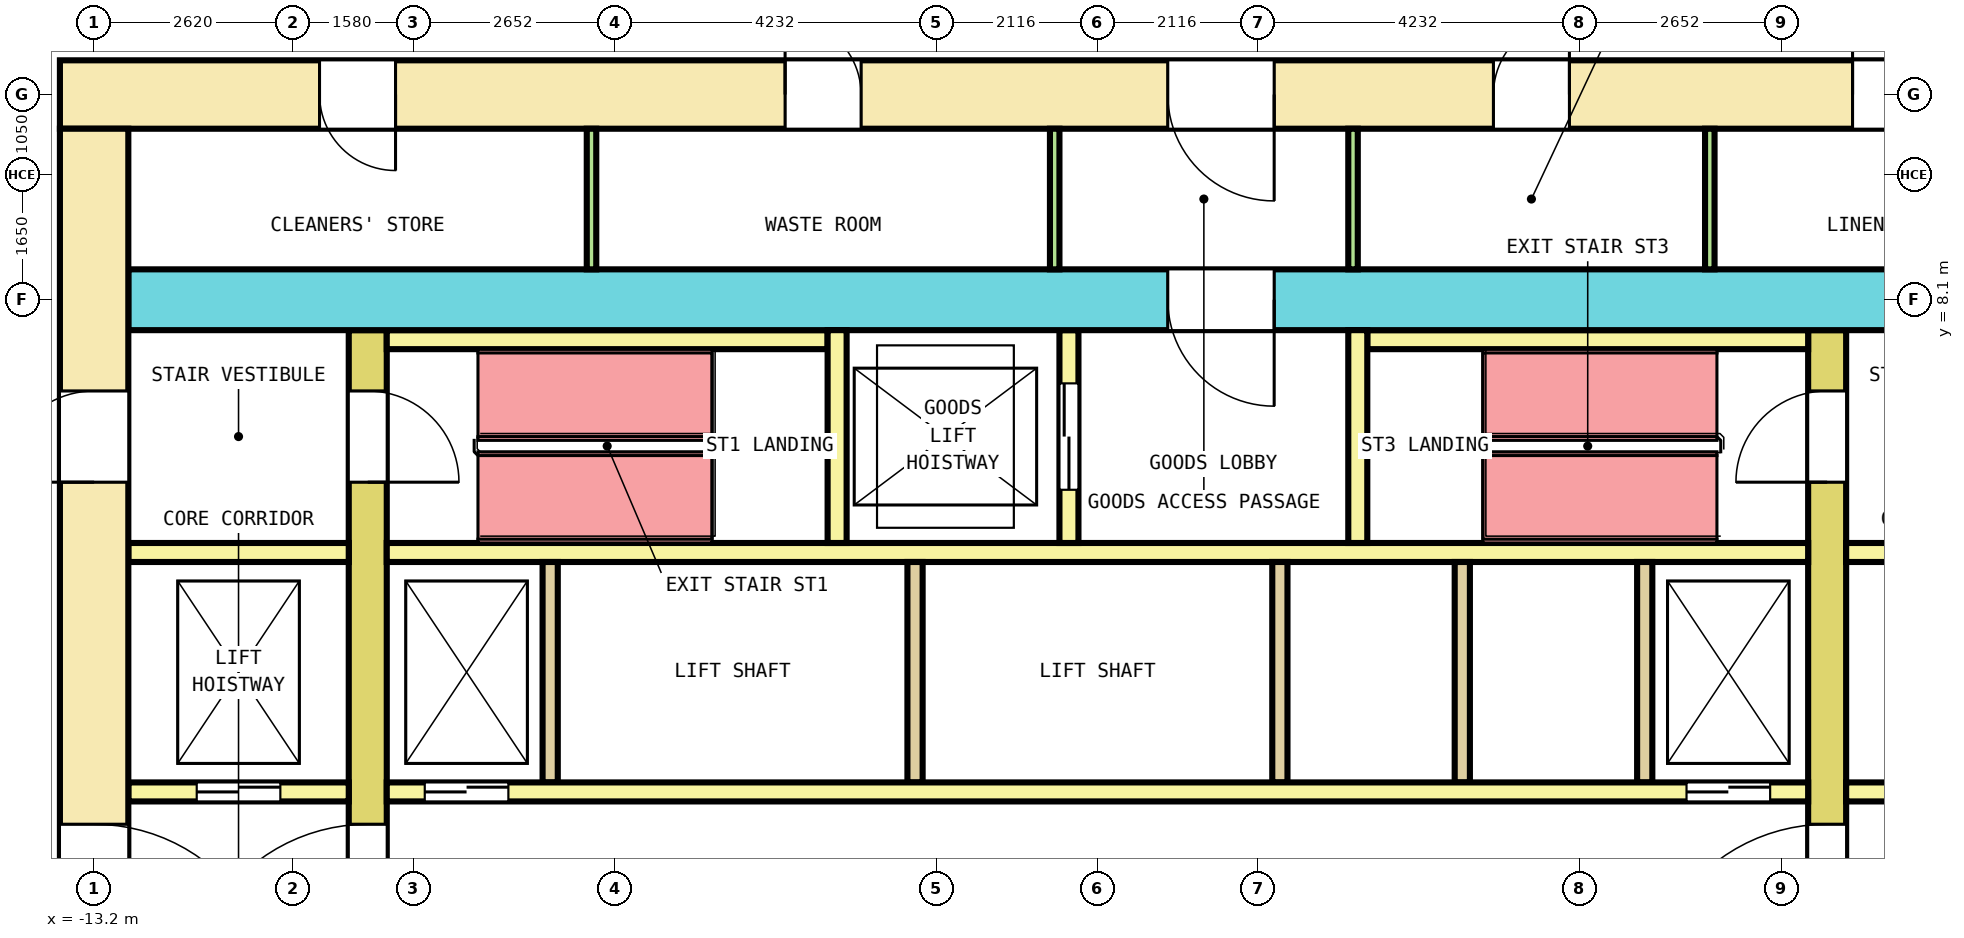
"""IFC4 building model, lengths in metres.
Left out: names, types, materials, properties, quantities, classifications, styles, units other than length and angle.
Written with IfcOpenShell. Run it as: python <this file> out.ifc"""

import sys

from ifc_helpers import new_model, si_unit, direction, frame, frame_2d, origin, place, context, subcontext, project, spatial, rectangle, extrude, element, fill, save


model = new_model("IFC4")
c1 = context("Model", 3, precision=1e-05, world=origin(), true_north=direction((0.0, 1.0)))
c2 = subcontext(c1, "Body", "Model", "MODEL_VIEW")
j1 = project(units=[si_unit("LENGTHUNIT", "METRE"), si_unit("PLANEANGLEUNIT", "RADIAN")], contexts=[c1])
p1 = place(None, origin())
s1 = spatial("IfcSite", under=j1, at=p1, CompositionType="ELEMENT")
p2 = place(p1, origin())
s2 = spatial("IfcBuilding", under=s1, at=p2, CompositionType="ELEMENT")
p3 = place(p2, frame((0.0, 0.0, 67.4)))
s3 = spatial("IfcBuildingStorey", under=s2, at=p3, CompositionType="ELEMENT", Elevation=67.4)
p4 = place(p3, frame((-13.65, 10.8, 0.0), z_axis=(0.0, 0.0, 1.0), x_axis=(1.0, 0.0, 0.0)))
e1 = element("IfcWall", 1, at=p4, inside=s3, PredefinedType="SHEAR", context=c2, shape_type="SweptSolid", body=[
    extrude(rectangle(XDim=27.3, YDim=0.9, at=frame_2d((13.65, 0.0))), origin(), (0.0, 0.0, 1.0), 4.1),
])
p5 = place(p4, frame((3.416, 0.0, 0.0)))
e2 = element("IfcOpeningElement", 2, at=p5, cuts=e1, PredefinedType="OPENING", context=c2, shape_type="SweptSolid", body=[
    extrude(rectangle(XDim=1.0, YDim=2.1, at=frame_2d((0.5, 1.05))), frame((0.0, 0.46, 0.0), z_axis=(0.0, -1.0, 0.0), x_axis=(1.0, 0.0, 0.0)), (0.0, 0.0, 1.0), 0.92),
])
p6 = place(p4, frame((9.541, 0.0, 0.0)))
e3 = element("IfcOpeningElement", 3, at=p6, cuts=e1, PredefinedType="OPENING", context=c2, shape_type="SweptSolid", body=[
    extrude(rectangle(XDim=1.0, YDim=2.1, at=frame_2d((0.5, 1.05))), frame((0.0, 0.46, 0.0), z_axis=(0.0, -1.0, 0.0), x_axis=(1.0, 0.0, 0.0)), (0.0, 0.0, 1.0), 0.92),
])
p7 = place(p4, frame((18.859, 0.0, 0.0)))
e4 = element("IfcOpeningElement", 4, at=p7, cuts=e1, PredefinedType="OPENING", context=c2, shape_type="SweptSolid", body=[
    extrude(rectangle(XDim=1.0, YDim=2.1, at=frame_2d((0.5, 1.05))), frame((0.0, 0.46, 0.0), z_axis=(0.0, -1.0, 0.0), x_axis=(1.0, 0.0, 0.0)), (0.0, 0.0, 1.0), 0.92),
])
p8 = place(p4, frame((23.584, 0.0, 0.0)))
e5 = element("IfcOpeningElement", 5, at=p8, cuts=e1, PredefinedType="OPENING", context=c2, shape_type="SweptSolid", body=[
    extrude(rectangle(XDim=1.0, YDim=2.1, at=frame_2d((0.5, 1.05))), frame((0.0, 0.46, 0.0), z_axis=(0.0, -1.0, 0.0), x_axis=(1.0, 0.0, 0.0)), (0.0, 0.0, 1.0), 0.92),
])
p9 = place(p4, frame((14.575, 0.0, 0.0)))
e6 = element("IfcOpeningElement", 6, at=p9, cuts=e1, PredefinedType="OPENING", context=c2, shape_type="SweptSolid", body=[
    extrude(rectangle(XDim=1.4, YDim=2.1, at=frame_2d((0.7, 1.05))), frame((0.0, 0.46, 0.0), z_axis=(0.0, -1.0, 0.0), x_axis=(1.0, 0.0, 0.0)), (0.0, 0.0, 1.0), 0.92),
])
p10 = place(p3, frame((-13.2, -10.35, 0.0), z_axis=(0.0, 0.0, 1.0), x_axis=(0.0, 1.0, 0.0)))
e7 = element("IfcWall", 7, at=p10, inside=s3, PredefinedType="SHEAR", context=c2, shape_type="SweptSolid", body=[
    extrude(rectangle(XDim=20.7, YDim=0.9, at=frame_2d((10.35, 0.0))), origin(), (0.0, 0.0, 1.0), 4.1),
])
p11 = place(p10, frame((9.15, 0.0, 0.0)))
e8 = element("IfcOpeningElement", 8, at=p11, cuts=e7, PredefinedType="OPENING", context=c2, shape_type="SweptSolid", body=[
    extrude(rectangle(XDim=2.4, YDim=2.1, at=frame_2d((1.2, 1.05))), frame((0.0, 0.46, 0.0), z_axis=(0.0, -1.0, 0.0), x_axis=(1.0, 0.0, 0.0)), (0.0, 0.0, 1.0), 0.92),
])
p12 = place(p10, frame((16.05, 0.0, 0.0)))
e9 = element("IfcOpeningElement", 9, at=p12, cuts=e7, PredefinedType="OPENING", context=c2, shape_type="SweptSolid", body=[
    extrude(rectangle(XDim=1.2, YDim=2.1, at=frame_2d((0.6, 1.05))), frame((0.0, 0.46, 0.0), z_axis=(0.0, -1.0, 0.0), x_axis=(1.0, 0.0, 0.0)), (0.0, 0.0, 1.0), 0.92),
])
p13 = place(p10, frame((3.45, 0.0, 0.0)))
e10 = element("IfcOpeningElement", 10, at=p13, cuts=e7, PredefinedType="OPENING", context=c2, shape_type="SweptSolid", body=[
    extrude(rectangle(XDim=1.2, YDim=2.1, at=frame_2d((0.6, 1.05))), frame((0.0, 0.46, 0.0), z_axis=(0.0, -1.0, 0.0), x_axis=(1.0, 0.0, 0.0)), (0.0, 0.0, 1.0), 0.92),
])
p14 = place(p3, frame((-12.75, 8.1, 0.0), z_axis=(0.0, 0.0, 1.0), x_axis=(1.0, 0.0, 0.0)))
e11 = element("IfcWall", 11, at=p14, inside=s3, PredefinedType="SHEAR", context=c2, shape_type="SweptSolid", body=[
    extrude(rectangle(XDim=25.5, YDim=0.8, at=frame_2d((12.75, 0.0))), origin(), (0.0, 0.0, 1.0), 4.1),
])
p15 = place(p14, frame((13.675, 0.0, 0.0)))
e12 = element("IfcOpeningElement", 12, at=p15, cuts=e11, PredefinedType="OPENING", context=c2, shape_type="SweptSolid", body=[
    extrude(rectangle(XDim=1.4, YDim=2.1, at=frame_2d((0.7, 1.05))), frame((0.0, 0.41, 0.0), z_axis=(0.0, -1.0, 0.0), x_axis=(1.0, 0.0, 0.0)), (0.0, 0.0, 1.0), 0.82),
])
p16 = place(p3, frame((-9.6, -7.7, 0.0), z_axis=(0.0, 0.0, 1.0), x_axis=(0.0, 1.0, 0.0)))
e13 = element("IfcWall", 13, at=p16, inside=s3, PredefinedType="SHEAR", context=c2, shape_type="SweptSolid", body=[
    extrude(rectangle(XDim=15.4, YDim=0.5, at=frame_2d((7.7, 0.0))), origin(), (0.0, 0.0, 1.0), 4.1),
])
p17 = place(p16, frame((6.5, 0.0, 0.0)))
e14 = element("IfcOpeningElement", 14, at=p17, cuts=e13, PredefinedType="OPENING", context=c2, shape_type="SweptSolid", body=[
    extrude(rectangle(XDim=2.4, YDim=2.1, at=frame_2d((1.2, 1.05))), frame((0.0, 0.26, 0.0), z_axis=(0.0, -1.0, 0.0), x_axis=(1.0, 0.0, 0.0)), (0.0, 0.0, 1.0), 0.52),
])
p18 = place(p16, frame((13.4, 0.0, 0.0)))
e15 = element("IfcOpeningElement", 15, at=p18, cuts=e13, PredefinedType="OPENING", context=c2, shape_type="SweptSolid", body=[
    extrude(rectangle(XDim=1.2, YDim=2.1, at=frame_2d((0.6, 1.05))), frame((0.0, 0.26, 0.0), z_axis=(0.0, -1.0, 0.0), x_axis=(1.0, 0.0, 0.0)), (0.0, 0.0, 1.0), 0.52),
])
p19 = place(p16, frame((0.8, 0.0, 0.0)))
e16 = element("IfcOpeningElement", 16, at=p19, cuts=e13, PredefinedType="OPENING", context=c2, shape_type="SweptSolid", body=[
    extrude(rectangle(XDim=1.2, YDim=2.1, at=frame_2d((0.6, 1.05))), frame((0.0, 0.26, 0.0), z_axis=(0.0, -1.0, 0.0), x_axis=(1.0, 0.0, 0.0)), (0.0, 0.0, 1.0), 0.52),
])
p20 = place(p3, frame((9.6, -7.7, 0.0), z_axis=(0.0, 0.0, 1.0), x_axis=(0.0, 1.0, 0.0)))
e17 = element("IfcWall", 17, at=p20, inside=s3, PredefinedType="SHEAR", context=c2, shape_type="SweptSolid", body=[
    extrude(rectangle(XDim=15.4, YDim=0.5, at=frame_2d((7.7, 0.0))), origin(), (0.0, 0.0, 1.0), 4.1),
])
p21 = place(p20, frame((6.5, 0.0, 0.0)))
e18 = element("IfcOpeningElement", 18, at=p21, cuts=e17, PredefinedType="OPENING", context=c2, shape_type="SweptSolid", body=[
    extrude(rectangle(XDim=2.4, YDim=2.1, at=frame_2d((1.2, 1.05))), frame((0.0, 0.26, 0.0), z_axis=(0.0, -1.0, 0.0), x_axis=(1.0, 0.0, 0.0)), (0.0, 0.0, 1.0), 0.52),
])
p22 = place(p20, frame((13.4, 0.0, 0.0)))
e19 = element("IfcOpeningElement", 19, at=p22, cuts=e17, PredefinedType="OPENING", context=c2, shape_type="SweptSolid", body=[
    extrude(rectangle(XDim=1.2, YDim=2.1, at=frame_2d((0.6, 1.05))), frame((0.0, 0.26, 0.0), z_axis=(0.0, -1.0, 0.0), x_axis=(1.0, 0.0, 0.0)), (0.0, 0.0, 1.0), 0.52),
])
p23 = place(p20, frame((0.9, 0.0, 0.0)))
e20 = element("IfcOpeningElement", 20, at=p23, cuts=e17, PredefinedType="OPENING", context=c2, shape_type="SweptSolid", body=[
    extrude(rectangle(XDim=1.0, YDim=2.1, at=frame_2d((0.5, 1.05))), frame((0.0, 0.26, 0.0), z_axis=(0.0, -1.0, 0.0), x_axis=(1.0, 0.0, 0.0)), (0.0, 0.0, 1.0), 0.52),
])
p24 = place(p3, frame((-12.75, 1.625, 0.0), z_axis=(0.0, 0.0, 1.0), x_axis=(1.0, 0.0, 0.0)))
e21 = element("IfcWall", 21, at=p24, inside=s3, PredefinedType="SOLIDWALL", context=c2, shape_type="SweptSolid", body=[
    extrude(rectangle(XDim=2.9, YDim=0.25, at=frame_2d((1.45, 0.0))), origin(), (0.0, 0.0, 1.0), 4.1),
])
p25 = place(p24, frame((0.9, 0.0, 0.0)))
e22 = element("IfcOpeningElement", 22, at=p25, cuts=e21, PredefinedType="OPENING", context=c2, shape_type="SweptSolid", body=[
    extrude(rectangle(XDim=1.1, YDim=2.1, at=frame_2d((0.55, 1.05))), frame((0.0, 0.135, 0.0), z_axis=(0.0, -1.0, 0.0), x_axis=(1.0, 0.0, 0.0)), (0.0, 0.0, 1.0), 0.27),
])
p26 = place(p3, frame((-9.35, 1.625, 0.0), z_axis=(0.0, 0.0, 1.0), x_axis=(1.0, 0.0, 0.0)))
e23 = element("IfcWall", 23, at=p26, inside=s3, PredefinedType="SOLIDWALL", context=c2, shape_type="SweptSolid", body=[
    extrude(rectangle(XDim=18.7, YDim=0.25, at=frame_2d((9.35, 0.0))), origin(), (0.0, 0.0, 1.0), 4.1),
])
p27 = place(p26, frame((0.5, 0.0, 0.0)))
e24 = element("IfcOpeningElement", 24, at=p27, cuts=e23, PredefinedType="OPENING", context=c2, shape_type="SweptSolid", body=[
    extrude(rectangle(XDim=1.1, YDim=2.1, at=frame_2d((0.55, 1.05))), frame((0.0, 0.135, 0.0), z_axis=(0.0, -1.0, 0.0), x_axis=(1.0, 0.0, 0.0)), (0.0, 0.0, 1.0), 0.27),
])
p28 = place(p26, frame((17.1, 0.0, 0.0)))
e25 = element("IfcOpeningElement", 25, at=p28, cuts=e23, PredefinedType="OPENING", context=c2, shape_type="SweptSolid", body=[
    extrude(rectangle(XDim=1.1, YDim=2.1, at=frame_2d((0.55, 1.05))), frame((0.0, 0.135, 0.0), z_axis=(0.0, -1.0, 0.0), x_axis=(1.0, 0.0, 0.0)), (0.0, 0.0, 1.0), 0.27),
])
p29 = place(p3, frame((9.85, 1.625, 0.0), z_axis=(0.0, 0.0, 1.0), x_axis=(1.0, 0.0, 0.0)))
e26 = element("IfcWall", 26, at=p29, inside=s3, PredefinedType="SOLIDWALL", context=c2, shape_type="SweptSolid", body=[
    extrude(rectangle(XDim=2.9, YDim=0.25, at=frame_2d((1.45, 0.0))), origin(), (0.0, 0.0, 1.0), 4.1),
])
p30 = place(p29, frame((0.9, 0.0, 0.0)))
e27 = element("IfcOpeningElement", 27, at=p30, cuts=e26, PredefinedType="OPENING", context=c2, shape_type="SweptSolid", body=[
    extrude(rectangle(XDim=1.1, YDim=2.1, at=frame_2d((0.55, 1.05))), frame((0.0, 0.135, 0.0), z_axis=(0.0, -1.0, 0.0), x_axis=(1.0, 0.0, 0.0)), (0.0, 0.0, 1.0), 0.27),
])
p31 = place(p3, frame((-12.75, 4.775, 0.0), z_axis=(0.0, 0.0, 1.0), x_axis=(1.0, 0.0, 0.0)))
e28 = element("IfcWall", 28, at=p31, inside=s3, PredefinedType="SOLIDWALL", context=c2, shape_type="SweptSolid", body=[
    extrude(rectangle(XDim=2.9, YDim=0.25, at=frame_2d((1.45, 0.0))), origin(), (0.0, 0.0, 1.0), 4.1),
])
p32 = place(p3, frame((-9.35, 4.775, 0.0), z_axis=(0.0, 0.0, 1.0), x_axis=(1.0, 0.0, 0.0)))
e29 = element("IfcWall", 29, at=p32, inside=s3, PredefinedType="SOLIDWALL", context=c2, shape_type="SweptSolid", body=[
    extrude(rectangle(XDim=18.7, YDim=0.25, at=frame_2d((9.35, 0.0))), origin(), (0.0, 0.0, 1.0), 4.1),
])
p33 = place(p3, frame((9.85, 4.775, 0.0), z_axis=(0.0, 0.0, 1.0), x_axis=(1.0, 0.0, 0.0)))
e30 = element("IfcWall", 30, at=p33, inside=s3, PredefinedType="SOLIDWALL", context=c2, shape_type="SweptSolid", body=[
    extrude(rectangle(XDim=2.9, YDim=0.25, at=frame_2d((1.45, 0.0))), origin(), (0.0, 0.0, 1.0), 4.1),
])
for number, where, z_axis, x_axis in (
    (31, (-7.2, 1.75, 0.0), (0.0, 0.0, 1.0), (0.0, 1.0, 0.0)),
    (32, (-2.4, 1.75, 0.0), (0.0, 0.0, 1.0), (0.0, 1.0, 0.0)),
    (33, (2.4, 1.75, 0.0), (0.0, 0.0, 1.0), (0.0, 1.0, 0.0)),
    (34, (4.8, 1.75, 0.0), (0.0, 0.0, 1.0), (0.0, 1.0, 0.0)),
    (35, (7.2, 1.75, 0.0), (0.0, 0.0, 1.0), (0.0, 1.0, 0.0)),
):
    element("IfcWall", number, at=place(p3, frame(where, z_axis=z_axis, x_axis=x_axis)), inside=s3, PredefinedType="SOLIDWALL", context=c2, shape_type="SweptSolid", body=[
        extrude(rectangle(XDim=2.9, YDim=0.2, at=frame_2d((1.45, 0.0))), origin(), (0.0, 0.0, 1.0), 4.1),
    ])
for number, where, z_axis, x_axis in (
    (36, (-9.35, 7.575, 0.0), (0.0, 0.0, 1.0), (1.0, 0.0, 0.0)),
    (37, (3.55, 7.575, 0.0), (0.0, 0.0, 1.0), (1.0, 0.0, 0.0)),
):
    element("IfcWall", number, at=place(p3, frame(where, z_axis=z_axis, x_axis=x_axis)), inside=s3, PredefinedType="SOLIDWALL", context=c2, shape_type="SweptSolid", body=[
        extrude(rectangle(XDim=5.8, YDim=0.25, at=frame_2d((2.9, 0.0))), origin(), (0.0, 0.0, 1.0), 4.1),
    ])
p34 = place(p3, frame((-3.425, 4.9, 0.0), z_axis=(0.0, 0.0, 1.0), x_axis=(0.0, 1.0, 0.0)))
e38 = element("IfcWall", 38, at=p34, inside=s3, PredefinedType="SOLIDWALL", context=c2, shape_type="SweptSolid", body=[
    extrude(rectangle(XDim=2.8, YDim=0.25, at=frame_2d((1.4, 0.0))), origin(), (0.0, 0.0, 1.0), 4.1),
])
p35 = place(p3, frame((-0.375, 4.9, 0.0), z_axis=(0.0, 0.0, 1.0), x_axis=(0.0, 1.0, 0.0)))
e39 = element("IfcWall", 39, at=p35, inside=s3, PredefinedType="SOLIDWALL", context=c2, shape_type="SweptSolid", body=[
    extrude(rectangle(XDim=2.8, YDim=0.25, at=frame_2d((1.4, 0.0))), origin(), (0.0, 0.0, 1.0), 4.1),
])
p36 = place(p35, frame((0.7, 0.0, 0.0)))
e40 = element("IfcOpeningElement", 40, at=p36, cuts=e39, PredefinedType="OPENING", context=c2, shape_type="SweptSolid", body=[
    extrude(rectangle(XDim=1.4, YDim=2.1, at=frame_2d((0.7, 1.05))), frame((0.0, 0.135, 0.0), z_axis=(0.0, -1.0, 0.0), x_axis=(1.0, 0.0, 0.0)), (0.0, 0.0, 1.0), 0.27),
])
p37 = place(p3, frame((3.425, 4.9, 0.0), z_axis=(0.0, 0.0, 1.0), x_axis=(0.0, 1.0, 0.0)))
e41 = element("IfcWall", 41, at=p37, inside=s3, PredefinedType="SOLIDWALL", context=c2, shape_type="SweptSolid", body=[
    extrude(rectangle(XDim=2.8, YDim=0.25, at=frame_2d((1.4, 0.0))), origin(), (0.0, 0.0, 1.0), 4.1),
])
for number, where, z_axis, x_axis in (
    (42, (-6.656, 8.5, 0.0), (0.0, 0.0, 1.0), (0.0, 1.0, 0.0)),
    (43, (-0.562, 8.5, 0.0), (0.0, 0.0, 1.0), (0.0, 1.0, 0.0)),
    (44, (3.363, 8.5, 0.0), (0.0, 0.0, 1.0), (0.0, 1.0, 0.0)),
    (45, (8.056, 8.5, 0.0), (0.0, 0.0, 1.0), (0.0, 1.0, 0.0)),
):
    element("IfcWall", number, at=place(p3, frame(where, z_axis=z_axis, x_axis=x_axis)), inside=s3, PredefinedType="PARTITIONING", context=c2, shape_type="SweptSolid", body=[
        extrude(rectangle(XDim=1.85, YDim=0.125, at=frame_2d((0.925, 0.0))), origin(), (0.0, 0.0, 1.0), 4.1),
    ])
p38 = place(p25, origin())
e46 = element("IfcDoor", 46, at=p38, inside=s3, OperationType="DOUBLE_DOOR_SLIDING", PredefinedType="DOOR", context=c2, shape_type="SweptSolid", body=[
    extrude(rectangle(XDim=1.1, YDim=2.1, at=frame_2d((0.55, 1.05))), frame((0.0, 0.075, 0.0), z_axis=(0.0, -1.0, 0.0), x_axis=(1.0, 0.0, 0.0)), (0.0, 0.0, 1.0), 0.15),
])
fill(e22, e46)
p39 = place(p27, origin())
e47 = element("IfcDoor", 47, at=p39, inside=s3, OperationType="DOUBLE_DOOR_SLIDING", PredefinedType="DOOR", context=c2, shape_type="SweptSolid", body=[
    extrude(rectangle(XDim=1.1, YDim=2.1, at=frame_2d((0.55, 1.05))), frame((0.0, 0.075, 0.0), z_axis=(0.0, -1.0, 0.0), x_axis=(1.0, 0.0, 0.0)), (0.0, 0.0, 1.0), 0.15),
])
fill(e24, e47)
p40 = place(p28, origin())
e48 = element("IfcDoor", 48, at=p40, inside=s3, OperationType="DOUBLE_DOOR_SLIDING", PredefinedType="DOOR", context=c2, shape_type="SweptSolid", body=[
    extrude(rectangle(XDim=1.1, YDim=2.1, at=frame_2d((0.55, 1.05))), frame((0.0, 0.075, 0.0), z_axis=(0.0, -1.0, 0.0), x_axis=(1.0, 0.0, 0.0)), (0.0, 0.0, 1.0), 0.15),
])
fill(e25, e48)
p41 = place(p36, origin())
e49 = element("IfcDoor", 49, at=p41, inside=s3, OperationType="DOUBLE_DOOR_SLIDING", PredefinedType="DOOR", context=c2, shape_type="SweptSolid", body=[
    extrude(rectangle(XDim=1.4, YDim=2.1, at=frame_2d((0.7, 1.05))), frame((0.0, 0.075, 0.0), z_axis=(0.0, -1.0, 0.0), x_axis=(1.0, 0.0, 0.0)), (0.0, 0.0, 1.0), 0.15),
])
fill(e40, e49)
p42 = place(p17, origin())
e50 = element("IfcDoor", 50, at=p42, inside=s3, OperationType="DOUBLE_DOOR_SINGLE_SWING", PredefinedType="DOOR", context=c2, shape_type="SweptSolid", body=[
    extrude(rectangle(XDim=2.4, YDim=2.1, at=frame_2d((1.2, 1.05))), frame((0.0, 0.2, 0.0), z_axis=(0.0, -1.0, 0.0), x_axis=(1.0, 0.0, 0.0)), (0.0, 0.0, 1.0), 0.4),
])
fill(e14, e50)
p43 = place(p21, origin())
e51 = element("IfcDoor", 51, at=p43, inside=s3, OperationType="DOUBLE_DOOR_SINGLE_SWING", PredefinedType="DOOR", context=c2, shape_type="SweptSolid", body=[
    extrude(rectangle(XDim=2.4, YDim=2.1, at=frame_2d((1.2, 1.05))), frame((0.0, 0.2, 0.0), z_axis=(0.0, -1.0, 0.0), x_axis=(1.0, 0.0, 0.0)), (0.0, 0.0, 1.0), 0.4),
])
fill(e18, e51)
p44 = place(p11, origin())
e52 = element("IfcDoor", 52, at=p44, inside=s3, OperationType="DOUBLE_DOOR_SINGLE_SWING", PredefinedType="DOOR", context=c2, shape_type="SweptSolid", body=[
    extrude(rectangle(XDim=2.4, YDim=2.1, at=frame_2d((1.2, 1.05))), frame((0.0, 0.3, 0.0), z_axis=(0.0, -1.0, 0.0), x_axis=(1.0, 0.0, 0.0)), (0.0, 0.0, 1.0), 0.6),
])
fill(e8, e52)
p45 = place(p18, origin())
e53 = element("IfcDoor", 53, at=p45, inside=s3, OperationType="SINGLE_SWING_LEFT", PredefinedType="DOOR", context=c2, shape_type="SweptSolid", body=[
    extrude(rectangle(XDim=1.2, YDim=2.1, at=frame_2d((0.6, 1.05))), frame((0.0, 0.2, 0.0), z_axis=(0.0, -1.0, 0.0), x_axis=(1.0, 0.0, 0.0)), (0.0, 0.0, 1.0), 0.4),
])
fill(e15, e53)
p46 = place(p12, origin())
e54 = element("IfcDoor", 54, at=p46, inside=s3, OperationType="SINGLE_SWING_RIGHT", PredefinedType="DOOR", context=c2, shape_type="SweptSolid", body=[
    extrude(rectangle(XDim=1.2, YDim=2.1, at=frame_2d((0.6, 1.05))), frame((0.0, 0.3, 0.0), z_axis=(0.0, -1.0, 0.0), x_axis=(1.0, 0.0, 0.0)), (0.0, 0.0, 1.0), 0.6),
])
fill(e9, e54)
p47 = place(p22, origin())
e55 = element("IfcDoor", 55, at=p47, inside=s3, OperationType="SINGLE_SWING_LEFT", PredefinedType="DOOR", context=c2, shape_type="SweptSolid", body=[
    extrude(rectangle(XDim=1.2, YDim=2.1, at=frame_2d((0.6, 1.05))), frame((0.0, 0.2, 0.0), z_axis=(0.0, -1.0, 0.0), x_axis=(1.0, 0.0, 0.0)), (0.0, 0.0, 1.0), 0.4),
])
fill(e19, e55)
p48 = place(p15, origin())
e56 = element("IfcDoor", 56, at=p48, inside=s3, OperationType="DOUBLE_DOOR_SINGLE_SWING", PredefinedType="DOOR", context=c2, shape_type="SweptSolid", body=[
    extrude(rectangle(XDim=1.4, YDim=2.1, at=frame_2d((0.7, 1.05))), frame((0.0, 0.3, 0.0), z_axis=(0.0, -1.0, 0.0), x_axis=(1.0, 0.0, 0.0)), (0.0, 0.0, 1.0), 0.6),
])
fill(e12, e56)
p49 = place(p5, origin())
e57 = element("IfcDoor", 57, at=p49, inside=s3, OperationType="SINGLE_SWING_LEFT", PredefinedType="DOOR", context=c2, shape_type="SweptSolid", body=[
    extrude(rectangle(XDim=1.0, YDim=2.1, at=frame_2d((0.5, 1.05))), frame((0.0, 0.3, 0.0), z_axis=(0.0, -1.0, 0.0), x_axis=(1.0, 0.0, 0.0)), (0.0, 0.0, 1.0), 0.6),
])
fill(e2, e57)
p50 = place(p6, origin())
e58 = element("IfcDoor", 58, at=p50, inside=s3, OperationType="SINGLE_SWING_RIGHT", PredefinedType="DOOR", context=c2, shape_type="SweptSolid", body=[
    extrude(rectangle(XDim=1.0, YDim=2.1, at=frame_2d((0.5, 1.05))), frame((0.0, 0.3, 0.0), z_axis=(0.0, -1.0, 0.0), x_axis=(1.0, 0.0, 0.0)), (0.0, 0.0, 1.0), 0.6),
])
fill(e3, e58)
p51 = place(p7, origin())
e59 = element("IfcDoor", 59, at=p51, inside=s3, OperationType="SINGLE_SWING_LEFT", PredefinedType="DOOR", context=c2, shape_type="SweptSolid", body=[
    extrude(rectangle(XDim=1.0, YDim=2.1, at=frame_2d((0.5, 1.05))), frame((0.0, 0.3, 0.0), z_axis=(0.0, -1.0, 0.0), x_axis=(1.0, 0.0, 0.0)), (0.0, 0.0, 1.0), 0.6),
])
fill(e4, e59)
p52 = place(p8, origin())
e60 = element("IfcDoor", 60, at=p52, inside=s3, OperationType="SINGLE_SWING_RIGHT", PredefinedType="DOOR", context=c2, shape_type="SweptSolid", body=[
    extrude(rectangle(XDim=1.0, YDim=2.1, at=frame_2d((0.5, 1.05))), frame((0.0, 0.3, 0.0), z_axis=(0.0, -1.0, 0.0), x_axis=(1.0, 0.0, 0.0)), (0.0, 0.0, 1.0), 0.6),
])
fill(e5, e60)
p53 = place(p9, origin())
e61 = element("IfcDoor", 61, at=p53, inside=s3, OperationType="DOUBLE_DOOR_SINGLE_SWING", PredefinedType="DOOR", context=c2, shape_type="SweptSolid", body=[
    extrude(rectangle(XDim=1.4, YDim=2.1, at=frame_2d((0.7, 1.05))), frame((0.0, 0.3, 0.0), z_axis=(0.0, -1.0, 0.0), x_axis=(1.0, 0.0, 0.0)), (0.0, 0.0, 1.0), 0.6),
])
fill(e6, e61)
save(model, sys.argv[1])
